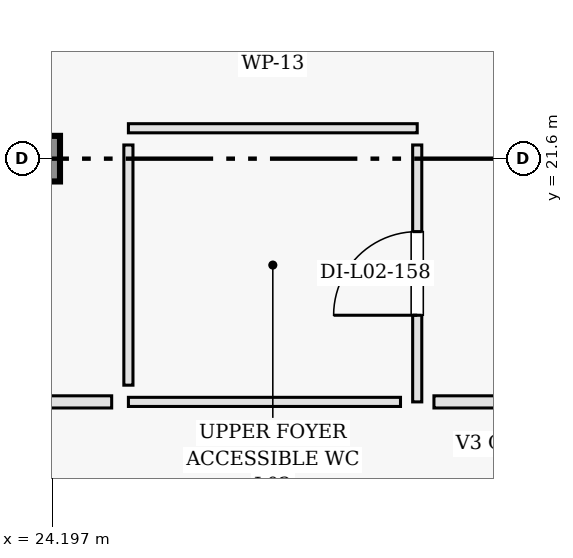
"""IFC4 building model, lengths in metres.
Left out: names, types, materials, properties, quantities, classifications, styles, units other than length and angle.
Written with IfcOpenShell. Run it as: python <this file> out.ifc"""

import sys

from ifc_helpers import new_model, si_unit, direction, frame, frame_2d, origin, origin_2d, place, context, subcontext, project, spatial, rectangle, extrude, element, fill, save


model = new_model("IFC4")
c1 = context("Model", 3, precision=1e-05, world=origin(), true_north=direction((0.0, 1.0)))
c2 = subcontext(c1, "Body", "Model", "MODEL_VIEW")
j1 = project(units=[si_unit("LENGTHUNIT", "METRE"), si_unit("PLANEANGLEUNIT", "RADIAN")], contexts=[c1])
p1 = place(None, origin())
s1 = spatial("IfcSite", under=j1, at=p1, CompositionType="ELEMENT")
p2 = place(p1, origin())
s2 = spatial("IfcBuilding", under=s1, at=p2, CompositionType="ELEMENT")
p3 = place(p2, frame((0.0, 0.0, 9.6)))
s3 = spatial("IfcBuildingStorey", under=s2, at=p3, CompositionType="ELEMENT", Elevation=9.6)
p4 = place(p3, frame((24.0, 21.6, 0.0), z_axis=(0.0, 0.0, 1.0), x_axis=(1.0, 0.0, 0.0)))
e1 = element("IfcColumn", 1, at=p4, inside=s3, PredefinedType="COLUMN", context=c2, shape_type="SweptSolid", body=[
    extrude(rectangle(XDim=0.6, YDim=0.6, at=origin_2d()), origin(), (0.0, 0.0, 1.0), 4.2),
])
p5 = place(p3, frame((25.2, 22.0, 0.0), z_axis=(0.0, 0.0, 1.0), x_axis=(1.0, 0.0, 0.0)))
e2 = element("IfcWall", 2, at=p5, inside=s3, PredefinedType="PARTITIONING", context=c2, shape_type="SweptSolid", body=[
    extrude(rectangle(XDim=3.8, YDim=0.12, at=frame_2d((1.9, 0.0))), origin(), (0.0, 0.0, 1.0), 3.94),
])
p6 = place(p3, frame((29.0, 18.4, 0.0), z_axis=(0.0, 0.0, 1.0), x_axis=(0.0, 1.0, 0.0)))
e3 = element("IfcWall", 3, at=p6, inside=s3, PredefinedType="PARTITIONING", context=c2, shape_type="SweptSolid", body=[
    extrude(rectangle(XDim=3.38, YDim=0.12, at=frame_2d((1.69, 0.0))), origin(), (0.0, 0.0, 1.0), 3.94),
])
p7 = place(p6, frame((1.14, 0.0, 0.0)))
e4 = element("IfcOpeningElement", 4, at=p7, cuts=e3, PredefinedType="OPENING", context=c2, shape_type="SweptSolid", body=[
    extrude(rectangle(XDim=1.1, YDim=2.15, at=frame_2d((0.55, 1.075))), frame((0.0, 0.07, 0.0), z_axis=(0.0, -1.0, 0.0), x_axis=(1.0, 0.0, 0.0)), (0.0, 0.0, 1.0), 0.14),
])
p8 = place(p3, frame((25.2, 18.4, 0.0), z_axis=(0.0, 0.0, 1.0), x_axis=(1.0, 0.0, 0.0)))
e5 = element("IfcWall", 5, at=p8, inside=s3, PredefinedType="PARTITIONING", context=c2, shape_type="SweptSolid", body=[
    extrude(rectangle(XDim=3.58, YDim=0.12, at=frame_2d((1.79, 0.0))), origin(), (0.0, 0.0, 1.0), 3.94),
])
p9 = place(p3, frame((25.2, 18.62, 0.0), z_axis=(0.0, 0.0, 1.0), x_axis=(0.0, 1.0, 0.0)))
e6 = element("IfcWall", 6, at=p9, inside=s3, PredefinedType="PARTITIONING", context=c2, shape_type="SweptSolid", body=[
    extrude(rectangle(XDim=3.16, YDim=0.12, at=frame_2d((1.58, 0.0))), origin(), (0.0, 0.0, 1.0), 3.94),
])
p10 = place(p3, frame((24.17, 18.4, 0.0), z_axis=(0.0, 0.0, 1.0), x_axis=(1.0, 0.0, 0.0)))
e7 = element("IfcWall", 7, at=p10, inside=s3, PredefinedType="PARTITIONING", context=c2, shape_type="SweptSolid", body=[
    extrude(rectangle(XDim=0.81, YDim=0.16, at=frame_2d((0.405, 0.0))), origin(), (0.0, 0.0, 1.0), 3.94),
])
p11 = place(p3, frame((29.22, 18.4, 0.0), z_axis=(0.0, 0.0, 1.0), x_axis=(1.0, 0.0, 0.0)))
e8 = element("IfcWall", 8, at=p11, inside=s3, PredefinedType="PARTITIONING", context=c2, shape_type="SweptSolid", body=[
    extrude(rectangle(XDim=1.98, YDim=0.16, at=frame_2d((0.99, 0.0))), origin(), (0.0, 0.0, 1.0), 3.94),
])
p12 = place(p7, origin())
e9 = element("IfcDoor", 9, at=p12, inside=s3, OperationType="SINGLE_SWING_LEFT", PredefinedType="DOOR", context=c2, shape_type="SweptSolid", body=[
    extrude(rectangle(XDim=1.1, YDim=2.15, at=frame_2d((0.55, 1.075))), frame((0.0, 0.025, 0.0), z_axis=(0.0, -1.0, 0.0), x_axis=(1.0, 0.0, 0.0)), (0.0, 0.0, 1.0), 0.05),
])
fill(e4, e9)
save(model, sys.argv[1])
